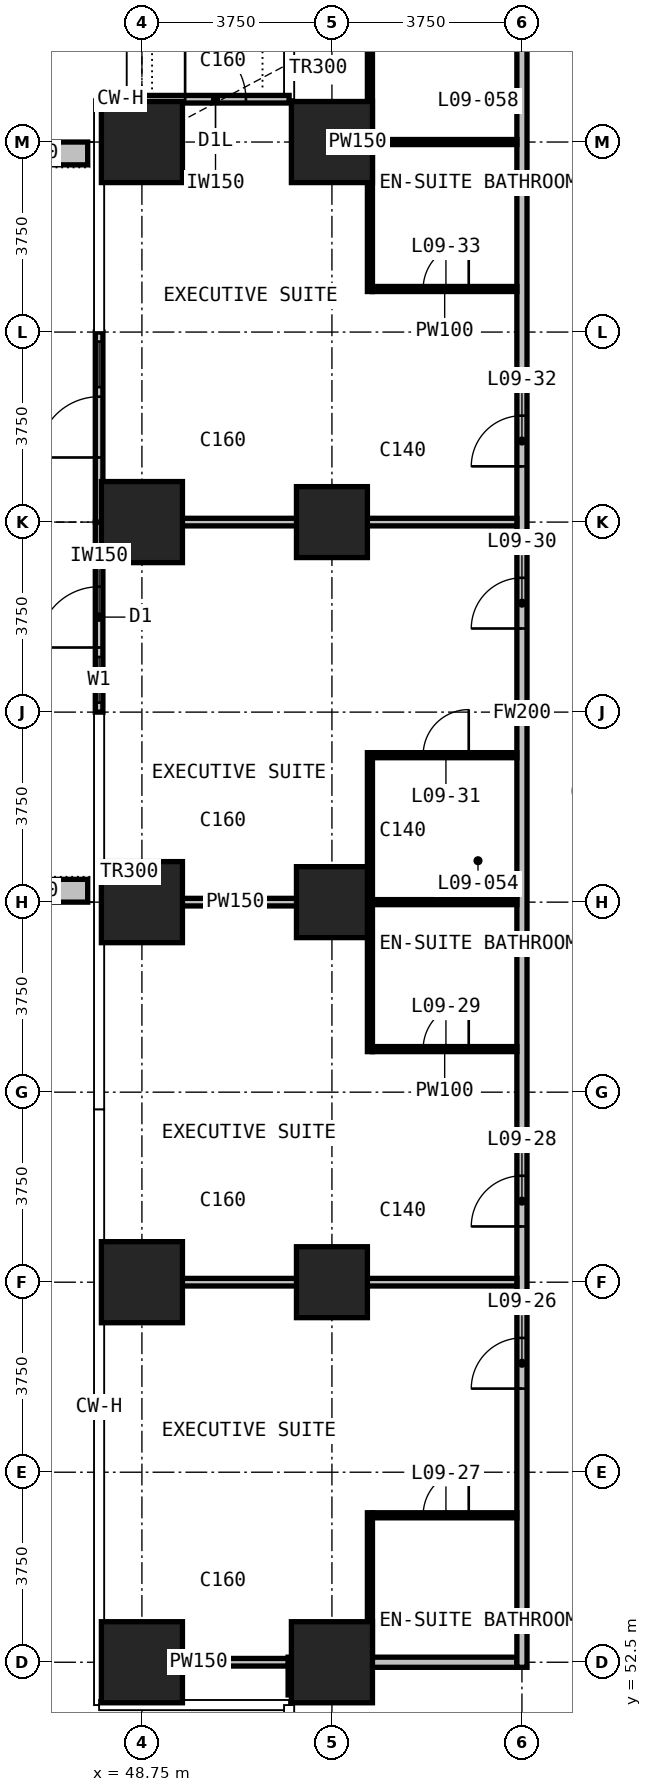
"""IFC4 building model, lengths in metres.
Left out: names, types, materials, properties, quantities, classifications, styles, units other than length and angle.
Written with IfcOpenShell. Run it as: python <this file> out.ifc"""

import sys

from ifc_helpers import new_model, si_unit, direction, frame, frame_2d, origin, origin_2d, place, context, subcontext, project, spatial, rectangle, extrude, element, fill, save


model = new_model("IFC4")
c1 = context("Model", 3, precision=1e-05, world=origin(), true_north=direction((0.0, 1.0)))
c2 = subcontext(c1, "Body", "Model", "MODEL_VIEW")
j1 = project(units=[si_unit("LENGTHUNIT", "METRE"), si_unit("PLANEANGLEUNIT", "RADIAN")], contexts=[c1])
p1 = place(None, origin())
s1 = spatial("IfcSite", under=j1, at=p1, CompositionType="ELEMENT")
p2 = place(p1, origin())
s2 = spatial("IfcBuilding", under=s1, at=p2, CompositionType="ELEMENT")
p3 = place(p2, frame((0.0, 0.0, 49.4)))
s3 = spatial("IfcBuildingStorey", under=s2, at=p3, CompositionType="ELEMENT", Elevation=49.4)
for number, where, z_axis, x_axis in (
    (1, (48.75, 52.5, 0.0), (0.0, 0.0, 1.0), (1.0, 0.0, 0.0)),
    (2, (48.75, 60.0, 0.0), (0.0, 0.0, 1.0), (1.0, 0.0, 0.0)),
    (3, (48.75, 67.5, 0.0), (0.0, 0.0, 1.0), (1.0, 0.0, 0.0)),
    (4, (48.75, 75.0, 0.0), (0.0, 0.0, 1.0), (1.0, 0.0, 0.0)),
    (5, (48.75, 82.5, 0.0), (0.0, 0.0, 1.0), (1.0, 0.0, 0.0)),
    (6, (52.5, 52.5, 0.0), (0.0, 0.0, 1.0), (1.0, 0.0, 0.0)),
):
    element("IfcColumn", number, at=place(p3, frame(where, z_axis=z_axis, x_axis=x_axis)), inside=s3, PredefinedType="COLUMN", context=c2, shape_type="SweptSolid", body=[
        extrude(rectangle(XDim=1.6, YDim=1.6, at=origin_2d()), origin(), (0.0, 0.0, 1.0), 3.3),
    ])
for number, where, z_axis, x_axis in (
    (7, (52.5, 60.0, 0.0), (0.0, 0.0, 1.0), (1.0, 0.0, 0.0)),
    (8, (52.5, 67.5, 0.0), (0.0, 0.0, 1.0), (1.0, 0.0, 0.0)),
    (9, (52.5, 75.0, 0.0), (0.0, 0.0, 1.0), (1.0, 0.0, 0.0)),
):
    element("IfcColumn", number, at=place(p3, frame(where, z_axis=z_axis, x_axis=x_axis)), inside=s3, PredefinedType="COLUMN", context=c2, shape_type="SweptSolid", body=[
        extrude(rectangle(XDim=1.4, YDim=1.4, at=origin_2d()), origin(), (0.0, 0.0, 1.0), 3.3),
    ])
p4 = place(p3, frame((52.5, 82.5, 0.0), z_axis=(0.0, 0.0, 1.0), x_axis=(1.0, 0.0, 0.0)))
e10 = element("IfcColumn", 10, at=p4, inside=s3, PredefinedType="COLUMN", context=c2, shape_type="SweptSolid", body=[
    extrude(rectangle(XDim=1.6, YDim=1.6, at=origin_2d()), origin(), (0.0, 0.0, 1.0), 3.3),
])
p5 = place(p3, frame((48.75, 83.345, 0.0), z_axis=(0.0, 0.0, 1.0), x_axis=(1.0, 0.0, 0.0)))
e11 = element("IfcWall", 11, at=p5, inside=s3, PredefinedType="SOLIDWALL", context=c2, shape_type="SweptSolid", body=[
    extrude(rectangle(XDim=2.905, YDim=0.15, at=frame_2d((1.453, 0.0))), origin(), (0.0, 0.0, 1.0), 3.0),
])
p6 = place(p5, frame((0.853, 0.0, 0.0)))
e12 = element("IfcOpeningElement", 12, at=p6, cuts=e11, PredefinedType="OPENING", context=c2, shape_type="SweptSolid", body=[
    extrude(rectangle(XDim=1.2, YDim=2.0, at=frame_2d((0.6, 1.0))), frame((0.0, 0.085, 0.0), z_axis=(0.0, -1.0, 0.0), x_axis=(1.0, 0.0, 0.0)), (0.0, 0.0, 1.0), 0.17),
])
p7 = place(p3, frame((47.905, 71.25, 0.0), z_axis=(0.0, 0.0, 1.0), x_axis=(0.0, 1.0, 0.0)))
e13 = element("IfcWall", 13, at=p7, inside=s3, PredefinedType="SOLIDWALL", context=c2, shape_type="SweptSolid", body=[
    extrude(rectangle(XDim=3.75, YDim=0.15, at=frame_2d((1.875, 0.0))), origin(), (0.0, 0.0, 1.0), 3.0),
])
p8 = place(p7, frame((0.188, 0.0, 0.1)))
e14 = element("IfcOpeningElement", 14, at=p8, cuts=e13, PredefinedType="OPENING", context=c2, shape_type="SweptSolid", body=[
    extrude(rectangle(XDim=0.9, YDim=2.4, at=frame_2d((0.45, 1.2))), frame((0.0, 0.085, 0.0), z_axis=(0.0, -1.0, 0.0), x_axis=(1.0, 0.0, 0.0)), (0.0, 0.0, 1.0), 0.17),
])
p9 = place(p7, frame((1.275, 0.0, 0.0)))
e15 = element("IfcOpeningElement", 15, at=p9, cuts=e13, PredefinedType="OPENING", context=c2, shape_type="SweptSolid", body=[
    extrude(rectangle(XDim=1.2, YDim=2.4, at=frame_2d((0.6, 1.2))), frame((0.0, 0.085, 0.0), z_axis=(0.0, -1.0, 0.0), x_axis=(1.0, 0.0, 0.0)), (0.0, 0.0, 1.0), 0.17),
])
p10 = place(p3, frame((47.905, 75.0, 0.0), z_axis=(0.0, 0.0, 1.0), x_axis=(0.0, 1.0, 0.0)))
e16 = element("IfcWall", 16, at=p10, inside=s3, PredefinedType="SOLIDWALL", context=c2, shape_type="SweptSolid", body=[
    extrude(rectangle(XDim=3.75, YDim=0.15, at=frame_2d((1.875, 0.0))), origin(), (0.0, 0.0, 1.0), 3.0),
])
p11 = place(p10, frame((1.275, 0.0, 0.0)))
e17 = element("IfcOpeningElement", 17, at=p11, cuts=e16, PredefinedType="OPENING", context=c2, shape_type="SweptSolid", body=[
    extrude(rectangle(XDim=1.2, YDim=2.4, at=frame_2d((0.6, 1.2))), frame((0.0, 0.085, 0.0), z_axis=(0.0, -1.0, 0.0), x_axis=(1.0, 0.0, 0.0)), (0.0, 0.0, 1.0), 0.17),
])
p12 = place(p10, frame((2.663, 0.0, 0.1)))
e18 = element("IfcOpeningElement", 18, at=p12, cuts=e16, PredefinedType="OPENING", context=c2, shape_type="SweptSolid", body=[
    extrude(rectangle(XDim=0.9, YDim=2.4, at=frame_2d((0.45, 1.2))), frame((0.0, 0.085, 0.0), z_axis=(0.0, -1.0, 0.0), x_axis=(1.0, 0.0, 0.0)), (0.0, 0.0, 1.0), 0.17),
])
for number, where, z_axis, x_axis in (
    (19, (47.68, 67.725, 0.0), (0.0, 0.0, 1.0), (-1.0, 0.0, 0.0)),
    (20, (47.68, 82.275, 0.0), (0.0, 0.0, 1.0), (-1.0, 0.0, 0.0)),
):
    element("IfcWall", number, at=place(p3, frame(where, z_axis=z_axis, x_axis=x_axis)), inside=s3, PredefinedType="USERDEFINED", context=c2, shape_type="SweptSolid", body=[
        extrude(rectangle(XDim=2.33, YDim=0.45, at=frame_2d((1.165, 0.0))), origin(), (0.0, 0.0, 1.0), 1.1),
    ])
p13 = place(p3, frame((51.835, 52.5, 0.0), z_axis=(0.0, 0.0, 1.0), x_axis=(1.0, 0.0, 0.0)))
e21 = element("IfcWall", 21, at=p13, inside=s3, PredefinedType="PARTITIONING", context=c2, shape_type="SweptSolid", body=[
    extrude(rectangle(XDim=4.315, YDim=0.2, at=frame_2d((2.157, 0.0))), origin(), (0.0, 0.0, 1.0), 3.0),
])
p14 = place(p3, frame((51.735, 51.855, 0.0), z_axis=(0.0, 0.0, 1.0), x_axis=(0.0, 1.0, 0.0)))
e22 = element("IfcWall", 22, at=p14, inside=s3, PredefinedType="PARTITIONING", context=c2, shape_type="SweptSolid", body=[
    extrude(rectangle(XDim=0.745, YDim=0.2, at=frame_2d((0.373, 0.0))), origin(), (0.0, 0.0, 1.0), 3.0),
])
p15 = place(p3, frame((56.25, 52.4, 0.0), z_axis=(0.0, 0.0, 1.0), x_axis=(0.0, 1.0, 0.0)))
e23 = element("IfcWall", 23, at=p15, inside=s3, PredefinedType="PARTITIONING", context=c2, shape_type="SweptSolid", body=[
    extrude(rectangle(XDim=37.675, YDim=0.2, at=frame_2d((18.837, 0.0))), origin(), (0.0, 0.0, 1.0), 3.0),
])
p16 = place(p15, frame((5.5, 0.0, 0.0)))
e24 = element("IfcOpeningElement", 24, at=p16, cuts=e23, PredefinedType="OPENING", context=c2, shape_type="SweptSolid", body=[
    extrude(rectangle(XDim=1.0, YDim=2.2, at=frame_2d((0.5, 1.1))), frame((0.0, 0.11, 0.0), z_axis=(0.0, -1.0, 0.0), x_axis=(1.0, 0.0, 0.0)), (0.0, 0.0, 1.0), 0.22),
])
p17 = place(p15, frame((8.7, 0.0, 0.0)))
e25 = element("IfcOpeningElement", 25, at=p17, cuts=e23, PredefinedType="OPENING", context=c2, shape_type="SweptSolid", body=[
    extrude(rectangle(XDim=1.0, YDim=2.2, at=frame_2d((0.5, 1.1))), frame((0.0, 0.11, 0.0), z_axis=(0.0, -1.0, 0.0), x_axis=(1.0, 0.0, 0.0)), (0.0, 0.0, 1.0), 0.22),
])
p18 = place(p15, frame((20.5, 0.0, 0.0)))
e26 = element("IfcOpeningElement", 26, at=p18, cuts=e23, PredefinedType="OPENING", context=c2, shape_type="SweptSolid", body=[
    extrude(rectangle(XDim=1.0, YDim=2.2, at=frame_2d((0.5, 1.1))), frame((0.0, 0.11, 0.0), z_axis=(0.0, -1.0, 0.0), x_axis=(1.0, 0.0, 0.0)), (0.0, 0.0, 1.0), 0.22),
])
p19 = place(p15, frame((23.7, 0.0, 0.0)))
e27 = element("IfcOpeningElement", 27, at=p19, cuts=e23, PredefinedType="OPENING", context=c2, shape_type="SweptSolid", body=[
    extrude(rectangle(XDim=1.0, YDim=2.2, at=frame_2d((0.5, 1.1))), frame((0.0, 0.11, 0.0), z_axis=(0.0, -1.0, 0.0), x_axis=(1.0, 0.0, 0.0)), (0.0, 0.0, 1.0), 0.22),
])
p20 = place(p15, frame((35.5, 0.0, 0.0)))
e28 = element("IfcOpeningElement", 28, at=p20, cuts=e23, PredefinedType="OPENING", context=c2, shape_type="SweptSolid", body=[
    extrude(rectangle(XDim=1.0, YDim=2.2, at=frame_2d((0.5, 1.1))), frame((0.0, 0.11, 0.0), z_axis=(0.0, -1.0, 0.0), x_axis=(1.0, 0.0, 0.0)), (0.0, 0.0, 1.0), 0.22),
])
p21 = place(p3, frame((48.105, 52.5, 0.0), z_axis=(0.0, 0.0, 1.0), x_axis=(1.0, 0.0, 0.0)))
e29 = element("IfcWall", 29, at=p21, inside=s3, PredefinedType="PARTITIONING", context=c2, shape_type="SweptSolid", body=[
    extrude(rectangle(XDim=3.53, YDim=0.15, at=frame_2d((1.765, 0.0))), origin(), (0.0, 0.0, 1.0), 3.0),
])
p22 = place(p3, frame((47.985, 60.0, 0.0), z_axis=(0.0, 0.0, 1.0), x_axis=(1.0, 0.0, 0.0)))
e30 = element("IfcWall", 30, at=p22, inside=s3, PredefinedType="PARTITIONING", context=c2, shape_type="SweptSolid", body=[
    extrude(rectangle(XDim=8.165, YDim=0.15, at=frame_2d((4.083, 0.0))), origin(), (0.0, 0.0, 1.0), 3.0),
])
p23 = place(p3, frame((47.985, 67.5, 0.0), z_axis=(0.0, 0.0, 1.0), x_axis=(1.0, 0.0, 0.0)))
e31 = element("IfcWall", 31, at=p23, inside=s3, PredefinedType="PARTITIONING", context=c2, shape_type="SweptSolid", body=[
    extrude(rectangle(XDim=5.215, YDim=0.15, at=frame_2d((2.607, 0.0))), origin(), (0.0, 0.0, 1.0), 3.0),
])
p24 = place(p3, frame((47.985, 75.0, 0.0), z_axis=(0.0, 0.0, 1.0), x_axis=(1.0, 0.0, 0.0)))
e32 = element("IfcWall", 32, at=p24, inside=s3, PredefinedType="PARTITIONING", context=c2, shape_type="SweptSolid", body=[
    extrude(rectangle(XDim=8.165, YDim=0.15, at=frame_2d((4.083, 0.0))), origin(), (0.0, 0.0, 1.0), 3.0),
])
p25 = place(p3, frame((52.81, 82.5, 0.0), z_axis=(0.0, 0.0, 1.0), x_axis=(1.0, 0.0, 0.0)))
e33 = element("IfcWall", 33, at=p25, inside=s3, PredefinedType="PARTITIONING", context=c2, shape_type="SweptSolid", body=[
    extrude(rectangle(XDim=0.39, YDim=0.15, at=frame_2d((0.195, 0.0))), origin(), (0.0, 0.0, 1.0), 3.0),
])
p26 = place(p3, frame((52.735, 82.425, 0.0), z_axis=(0.0, 0.0, 1.0), x_axis=(0.0, 1.0, 0.0)))
e34 = element("IfcWall", 34, at=p26, inside=s3, PredefinedType="PARTITIONING", context=c2, shape_type="SweptSolid", body=[
    extrude(rectangle(XDim=0.84, YDim=0.15, at=frame_2d((0.42, 0.0))), origin(), (0.0, 0.0, 1.0), 3.0),
])
p27 = place(p3, frame((53.3, 55.4, 0.0), z_axis=(0.0, 0.0, 1.0), x_axis=(1.0, 0.0, 0.0)))
e35 = element("IfcWall", 35, at=p27, inside=s3, PredefinedType="PARTITIONING", context=c2, shape_type="SweptSolid", body=[
    extrude(rectangle(XDim=2.85, YDim=0.1, at=frame_2d((1.425, 0.0))), origin(), (0.0, 0.0, 1.0), 3.0),
])
p28 = place(p27, frame((1.0, 0.0, 0.0)))
e36 = element("IfcOpeningElement", 36, at=p28, cuts=e35, PredefinedType="OPENING", context=c2, shape_type="SweptSolid", body=[
    extrude(rectangle(XDim=0.9, YDim=2.2, at=frame_2d((0.45, 1.1))), frame((0.0, 0.06, 0.0), z_axis=(0.0, -1.0, 0.0), x_axis=(1.0, 0.0, 0.0)), (0.0, 0.0, 1.0), 0.12),
])
p29 = place(p3, frame((53.3, 64.6, 0.0), z_axis=(0.0, 0.0, 1.0), x_axis=(1.0, 0.0, 0.0)))
e37 = element("IfcWall", 37, at=p29, inside=s3, PredefinedType="PARTITIONING", context=c2, shape_type="SweptSolid", body=[
    extrude(rectangle(XDim=2.85, YDim=0.1, at=frame_2d((1.425, 0.0))), origin(), (0.0, 0.0, 1.0), 3.0),
])
p30 = place(p29, frame((1.0, 0.0, 0.0)))
e38 = element("IfcOpeningElement", 38, at=p30, cuts=e37, PredefinedType="OPENING", context=c2, shape_type="SweptSolid", body=[
    extrude(rectangle(XDim=0.9, YDim=2.2, at=frame_2d((0.45, 1.1))), frame((0.0, 0.06, 0.0), z_axis=(0.0, -1.0, 0.0), x_axis=(1.0, 0.0, 0.0)), (0.0, 0.0, 1.0), 0.12),
])
p31 = place(p3, frame((53.3, 67.5, 0.0), z_axis=(0.0, 0.0, 1.0), x_axis=(1.0, 0.0, 0.0)))
e39 = element("IfcWall", 39, at=p31, inside=s3, PredefinedType="PARTITIONING", context=c2, shape_type="SweptSolid", body=[
    extrude(rectangle(XDim=2.85, YDim=0.1, at=frame_2d((1.425, 0.0))), origin(), (0.0, 0.0, 1.0), 3.0),
])
p32 = place(p3, frame((53.3, 70.4, 0.0), z_axis=(0.0, 0.0, 1.0), x_axis=(1.0, 0.0, 0.0)))
e40 = element("IfcWall", 40, at=p32, inside=s3, PredefinedType="PARTITIONING", context=c2, shape_type="SweptSolid", body=[
    extrude(rectangle(XDim=2.85, YDim=0.1, at=frame_2d((1.425, 0.0))), origin(), (0.0, 0.0, 1.0), 3.0),
])
p33 = place(p32, frame((1.0, 0.0, 0.0)))
e41 = element("IfcOpeningElement", 41, at=p33, cuts=e40, PredefinedType="OPENING", context=c2, shape_type="SweptSolid", body=[
    extrude(rectangle(XDim=0.9, YDim=2.2, at=frame_2d((0.45, 1.1))), frame((0.0, 0.06, 0.0), z_axis=(0.0, -1.0, 0.0), x_axis=(1.0, 0.0, 0.0)), (0.0, 0.0, 1.0), 0.12),
])
p34 = place(p3, frame((53.3, 79.6, 0.0), z_axis=(0.0, 0.0, 1.0), x_axis=(1.0, 0.0, 0.0)))
e42 = element("IfcWall", 42, at=p34, inside=s3, PredefinedType="PARTITIONING", context=c2, shape_type="SweptSolid", body=[
    extrude(rectangle(XDim=2.85, YDim=0.1, at=frame_2d((1.425, 0.0))), origin(), (0.0, 0.0, 1.0), 3.0),
])
p35 = place(p34, frame((1.0, 0.0, 0.0)))
e43 = element("IfcOpeningElement", 43, at=p35, cuts=e42, PredefinedType="OPENING", context=c2, shape_type="SweptSolid", body=[
    extrude(rectangle(XDim=0.9, YDim=2.2, at=frame_2d((0.45, 1.1))), frame((0.0, 0.06, 0.0), z_axis=(0.0, -1.0, 0.0), x_axis=(1.0, 0.0, 0.0)), (0.0, 0.0, 1.0), 0.12),
])
for number, where, z_axis, x_axis in (
    (44, (53.3, 82.5, 0.0), (0.0, 0.0, 1.0), (1.0, 0.0, 0.0)),
    (45, (53.25, 52.6, 0.0), (0.0, 0.0, 1.0), (0.0, 1.0, 0.0)),
):
    element("IfcWall", number, at=place(p3, frame(where, z_axis=z_axis, x_axis=x_axis)), inside=s3, PredefinedType="PARTITIONING", context=c2, shape_type="SweptSolid", body=[
        extrude(rectangle(XDim=2.85, YDim=0.1, at=frame_2d((1.425, 0.0))), origin(), (0.0, 0.0, 1.0), 3.0),
    ])
for number, where, z_axis, x_axis in (
    (46, (53.25, 64.55, 0.0), (0.0, 0.0, 1.0), (0.0, 1.0, 0.0)),
    (47, (53.25, 79.55, 0.0), (0.0, 0.0, 1.0), (0.0, 1.0, 0.0)),
):
    element("IfcWall", number, at=place(p3, frame(where, z_axis=z_axis, x_axis=x_axis)), inside=s3, PredefinedType="PARTITIONING", context=c2, shape_type="SweptSolid", body=[
        extrude(rectangle(XDim=5.9, YDim=0.1, at=frame_2d((2.95, 0.0))), origin(), (0.0, 0.0, 1.0), 3.0),
    ])
p36 = place(p6, origin())
e48 = element("IfcDoor", 48, at=p36, inside=s3, OperationType="SINGLE_SWING_LEFT", PredefinedType="DOOR", context=c2, shape_type="SweptSolid", body=[
    extrude(rectangle(XDim=1.2, YDim=2.0, at=frame_2d((0.6, 1.0))), frame((0.0, 0.025, 0.0), z_axis=(0.0, -1.0, 0.0), x_axis=(1.0, 0.0, 0.0)), (0.0, 0.0, 1.0), 0.05),
])
fill(e12, e48)
p37 = place(p8, origin())
e49 = element("IfcWindow", 49, at=p37, inside=s3, PartitioningType="SINGLE_PANEL", PredefinedType="WINDOW", context=c2, shape_type="SweptSolid", body=[
    extrude(rectangle(XDim=0.9, YDim=2.4, at=frame_2d((0.45, 1.2))), frame((0.0, 0.03, 0.0), z_axis=(0.0, -1.0, 0.0), x_axis=(1.0, 0.0, 0.0)), (0.0, 0.0, 1.0), 0.06),
])
fill(e14, e49)
p38 = place(p9, origin())
e50 = element("IfcDoor", 50, at=p38, inside=s3, OperationType="SINGLE_SWING_LEFT", PredefinedType="DOOR", context=c2, shape_type="SweptSolid", body=[
    extrude(rectangle(XDim=1.2, YDim=2.4, at=frame_2d((0.6, 1.2))), frame((0.0, 0.025, 0.0), z_axis=(0.0, -1.0, 0.0), x_axis=(1.0, 0.0, 0.0)), (0.0, 0.0, 1.0), 0.05),
])
fill(e15, e50)
p39 = place(p11, origin())
e51 = element("IfcDoor", 51, at=p39, inside=s3, OperationType="SINGLE_SWING_LEFT", PredefinedType="DOOR", context=c2, shape_type="SweptSolid", body=[
    extrude(rectangle(XDim=1.2, YDim=2.4, at=frame_2d((0.6, 1.2))), frame((0.0, 0.025, 0.0), z_axis=(0.0, -1.0, 0.0), x_axis=(1.0, 0.0, 0.0)), (0.0, 0.0, 1.0), 0.05),
])
fill(e17, e51)
p40 = place(p12, origin())
e52 = element("IfcWindow", 52, at=p40, inside=s3, PartitioningType="SINGLE_PANEL", PredefinedType="WINDOW", context=c2, shape_type="SweptSolid", body=[
    extrude(rectangle(XDim=0.9, YDim=2.4, at=frame_2d((0.45, 1.2))), frame((0.0, 0.03, 0.0), z_axis=(0.0, -1.0, 0.0), x_axis=(1.0, 0.0, 0.0)), (0.0, 0.0, 1.0), 0.06),
])
fill(e18, e52)
p41 = place(p16, origin())
e53 = element("IfcDoor", 53, at=p41, inside=s3, OperationType="SINGLE_SWING_LEFT", PredefinedType="DOOR", context=c2, shape_type="SweptSolid", body=[
    extrude(rectangle(XDim=1.0, YDim=2.2, at=frame_2d((0.5, 1.1))), frame((0.0, 0.025, 0.0), z_axis=(0.0, -1.0, 0.0), x_axis=(1.0, 0.0, 0.0)), (0.0, 0.0, 1.0), 0.05),
])
fill(e24, e53)
p42 = place(p28, origin())
e54 = element("IfcDoor", 54, at=p42, inside=s3, OperationType="SINGLE_SWING_RIGHT", PredefinedType="DOOR", context=c2, shape_type="SweptSolid", body=[
    extrude(rectangle(XDim=0.9, YDim=2.2, at=frame_2d((0.45, 1.1))), frame((0.0, 0.025, 0.0), z_axis=(0.0, -1.0, 0.0), x_axis=(1.0, 0.0, 0.0)), (0.0, 0.0, 1.0), 0.05),
])
fill(e36, e54)
p43 = place(p17, origin())
e55 = element("IfcDoor", 55, at=p43, inside=s3, OperationType="SINGLE_SWING_LEFT", PredefinedType="DOOR", context=c2, shape_type="SweptSolid", body=[
    extrude(rectangle(XDim=1.0, YDim=2.2, at=frame_2d((0.5, 1.1))), frame((0.0, 0.025, 0.0), z_axis=(0.0, -1.0, 0.0), x_axis=(1.0, 0.0, 0.0)), (0.0, 0.0, 1.0), 0.05),
])
fill(e25, e55)
p44 = place(p30, origin())
e56 = element("IfcDoor", 56, at=p44, inside=s3, OperationType="SINGLE_SWING_RIGHT", PredefinedType="DOOR", context=c2, shape_type="SweptSolid", body=[
    extrude(rectangle(XDim=0.9, YDim=2.2, at=frame_2d((0.45, 1.1))), frame((0.0, 0.025, 0.0), z_axis=(0.0, -1.0, 0.0), x_axis=(1.0, 0.0, 0.0)), (0.0, 0.0, 1.0), 0.05),
])
fill(e38, e56)
p45 = place(p18, origin())
e57 = element("IfcDoor", 57, at=p45, inside=s3, OperationType="SINGLE_SWING_RIGHT", PredefinedType="DOOR", context=c2, shape_type="SweptSolid", body=[
    extrude(rectangle(XDim=1.0, YDim=2.2, at=frame_2d((0.5, 1.1))), frame((0.0, 0.025, 0.0), z_axis=(0.0, -1.0, 0.0), x_axis=(1.0, 0.0, 0.0)), (0.0, 0.0, 1.0), 0.05),
])
fill(e26, e57)
p46 = place(p33, origin())
e58 = element("IfcDoor", 58, at=p46, inside=s3, OperationType="SINGLE_SWING_RIGHT", PredefinedType="DOOR", context=c2, shape_type="SweptSolid", body=[
    extrude(rectangle(XDim=0.9, YDim=2.2, at=frame_2d((0.45, 1.1))), frame((0.0, 0.025, 0.0), z_axis=(0.0, -1.0, 0.0), x_axis=(1.0, 0.0, 0.0)), (0.0, 0.0, 1.0), 0.05),
])
fill(e41, e58)
p47 = place(p19, origin())
e59 = element("IfcDoor", 59, at=p47, inside=s3, OperationType="SINGLE_SWING_LEFT", PredefinedType="DOOR", context=c2, shape_type="SweptSolid", body=[
    extrude(rectangle(XDim=1.0, YDim=2.2, at=frame_2d((0.5, 1.1))), frame((0.0, 0.025, 0.0), z_axis=(0.0, -1.0, 0.0), x_axis=(1.0, 0.0, 0.0)), (0.0, 0.0, 1.0), 0.05),
])
fill(e27, e59)
p48 = place(p35, origin())
e60 = element("IfcDoor", 60, at=p48, inside=s3, OperationType="SINGLE_SWING_RIGHT", PredefinedType="DOOR", context=c2, shape_type="SweptSolid", body=[
    extrude(rectangle(XDim=0.9, YDim=2.2, at=frame_2d((0.45, 1.1))), frame((0.0, 0.025, 0.0), z_axis=(0.0, -1.0, 0.0), x_axis=(1.0, 0.0, 0.0)), (0.0, 0.0, 1.0), 0.05),
])
fill(e43, e60)
save(model, sys.argv[1])
